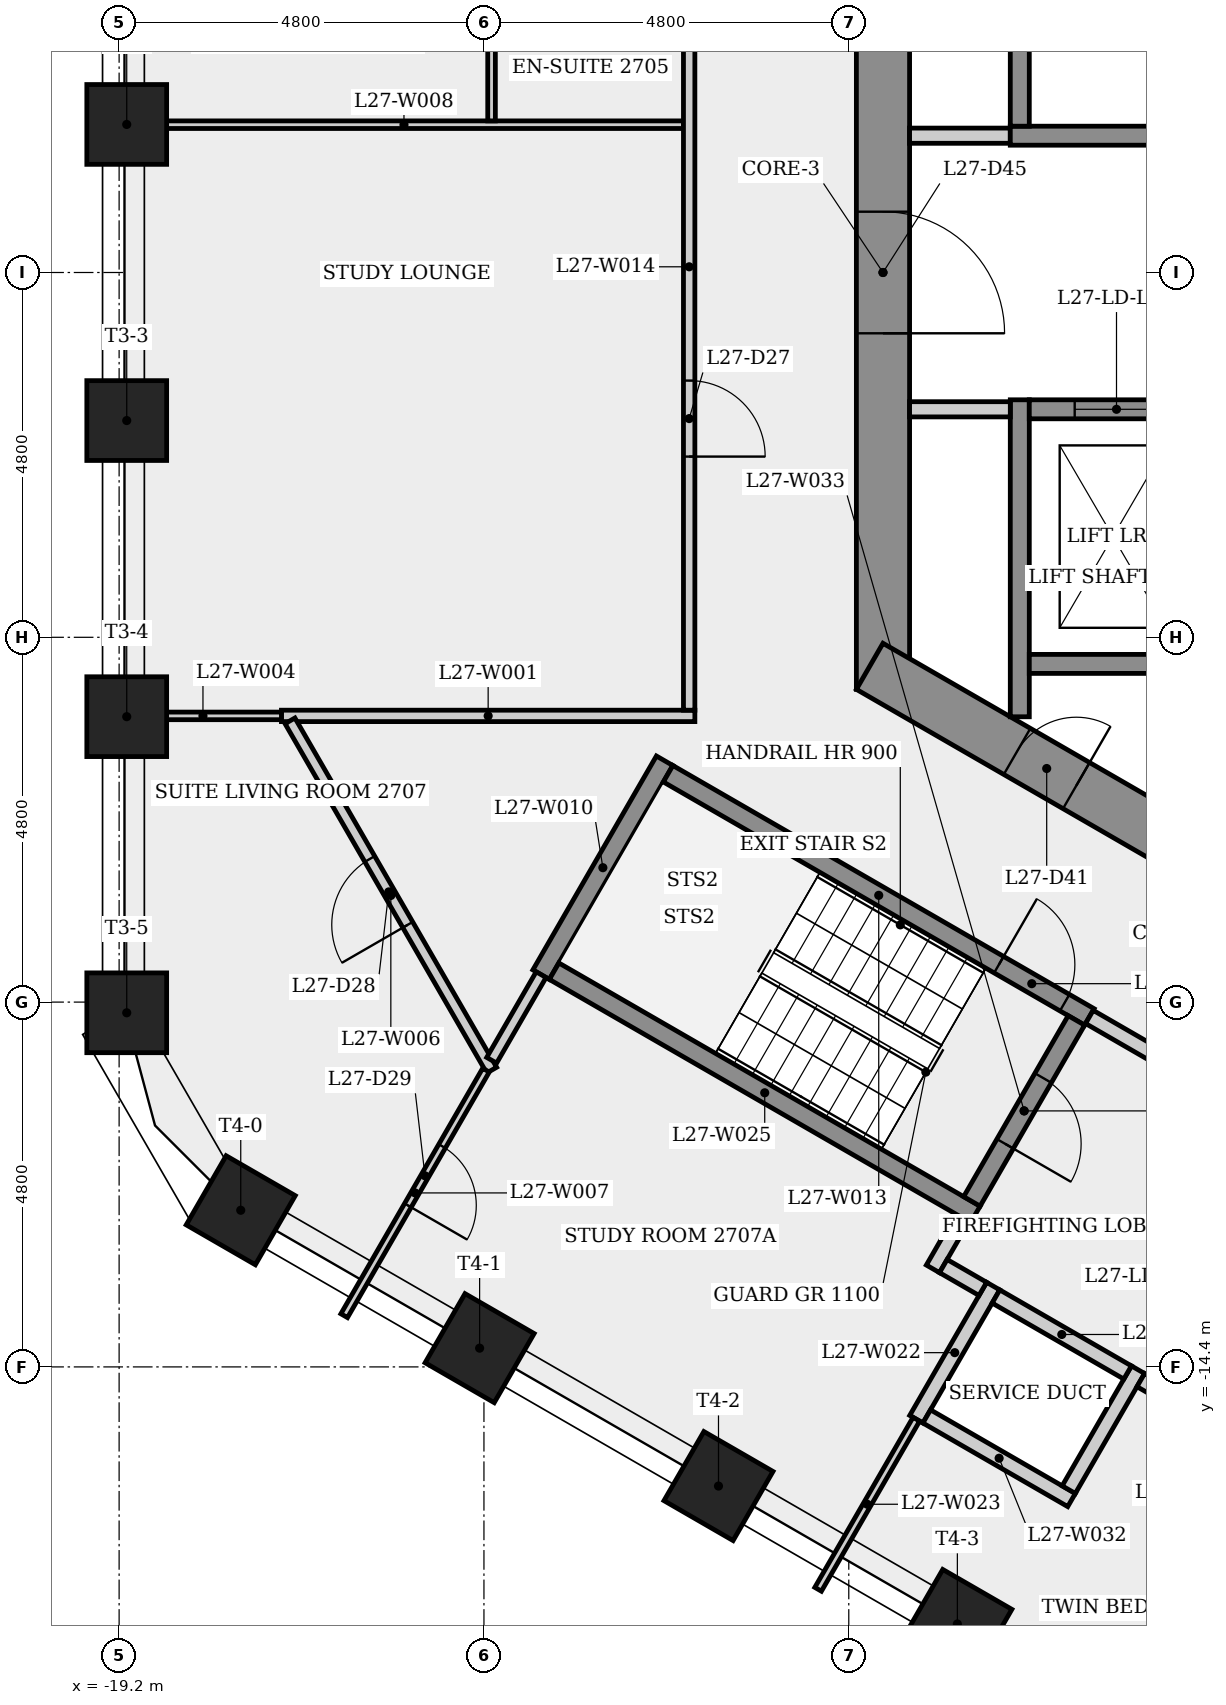
"""IFC4 building model, lengths in metres.
Left out: names, types, materials, properties, quantities, classifications, styles, units other than length and angle.
Written with IfcOpenShell. Run it as: python <this file> out.ifc"""

import sys

from ifc_helpers import new_model, si_unit, direction, frame, frame_2d, origin, origin_2d, place, context, subcontext, project, spatial, rectangle, extrude, element, fill, save


model = new_model("IFC4")
c1 = context("Model", 3, precision=1e-05, world=origin(), true_north=direction((0.0, 1.0)))
c2 = subcontext(c1, "Body", "Model", "MODEL_VIEW")
j1 = project(units=[si_unit("LENGTHUNIT", "METRE"), si_unit("PLANEANGLEUNIT", "RADIAN")], contexts=[c1])
p1 = place(None, origin())
s1 = spatial("IfcSite", under=j1, at=p1, CompositionType="ELEMENT")
p2 = place(p1, origin())
s2 = spatial("IfcBuilding", under=s1, at=p2, CompositionType="ELEMENT")
p3 = place(p2, frame((0.0, 0.0, 103.5)))
s3 = spatial("IfcBuildingStorey", under=s2, at=p3, CompositionType="ELEMENT", Elevation=103.5)
p4 = place(p3, frame((-9.15, 5.485, 0.0), z_axis=(0.0, 0.0, 1.0), x_axis=(0.0, -1.0, 0.0)))
e1 = element("IfcWall", 1, at=p4, inside=s3, PredefinedType="SHEAR", context=c2, shape_type="SweptSolid", body=[
    extrude(rectangle(XDim=10.97, YDim=0.7, at=frame_2d((5.485, 0.0))), origin(), (0.0, 0.0, 1.0), 3.4),
])
p5 = place(p4, frame((4.685, 0.0, 0.0)))
e2 = element("IfcOpeningElement", 2, at=p5, cuts=e1, PredefinedType="OPENING", context=c2, shape_type="SweptSolid", body=[
    extrude(rectangle(XDim=1.6, YDim=2.1, at=frame_2d((0.8, 1.05))), frame((0.0, 0.36, 0.0), z_axis=(0.0, -1.0, 0.0), x_axis=(1.0, 0.0, 0.0)), (0.0, 0.0, 1.0), 0.72),
])
p6 = place(p3, frame((-9.325, -5.182, 0.0), z_axis=(0.0, 0.0, 1.0), x_axis=(0.866023993627, -0.500002442456, 0.0)))
e3 = element("IfcWall", 3, at=p6, inside=s3, PredefinedType="SHEAR", context=c2, shape_type="SweptSolid", body=[
    extrude(rectangle(XDim=10.97, YDim=0.7, at=frame_2d((5.485, 0.0))), origin(), (0.0, 0.0, 1.0), 3.4),
])
p7 = place(p6, frame((2.239, 0.0, 0.0)))
e4 = element("IfcOpeningElement", 4, at=p7, cuts=e3, PredefinedType="OPENING", context=c2, shape_type="SweptSolid", body=[
    extrude(rectangle(XDim=0.9, YDim=2.1, at=frame_2d((0.45, 1.05))), frame((0.0, 0.36, 0.0), z_axis=(0.0, -1.0, 0.0), x_axis=(1.0, 0.0, 0.0)), (0.0, 0.0, 1.0), 0.72),
])
p8 = place(p6, frame((8.96, 0.0, 0.0)))
e5 = element("IfcOpeningElement", 5, at=p8, cuts=e3, PredefinedType="OPENING", context=c2, shape_type="SweptSolid", body=[
    extrude(rectangle(XDim=0.9, YDim=2.1, at=frame_2d((0.45, 1.05))), frame((0.0, 0.36, 0.0), z_axis=(0.0, -1.0, 0.0), x_axis=(1.0, 0.0, 0.0)), (0.0, 0.0, 1.0), 0.72),
])
for number, where, z_axis, x_axis in (
    (6, (-19.1, 1.948, 0.0), (0.0, 0.0, 1.0), (-1.0, 0.0, 0.0)),
    (7, (-19.1, -1.948, 0.0), (0.0, 0.0, 1.0), (-1.0, 0.0, 0.0)),
    (8, (-19.1, -5.844, 0.0), (0.0, 0.0, 1.0), (-1.0, 0.0, 0.0)),
    (9, (-19.1, -9.741, 0.0), (0.0, 0.0, 1.0), (-1.0, 0.0, 0.0)),
    (10, (-17.6, -12.339, 0.0), (0.0, 0.0, 1.0), (-0.5, -0.866, 0.0)),
    (11, (-14.457, -14.153, 0.0), (0.0, 0.0, 1.0), (-0.5, -0.866, 0.0)),
    (12, (-11.314, -15.968, 0.0), (0.0, 0.0, 1.0), (-0.5, -0.866, 0.0)),
    (13, (-8.171, -17.782, 0.0), (0.0, 0.0, 1.0), (-0.5, -0.866, 0.0)),
):
    element("IfcColumn", number, at=place(p3, frame(where, z_axis=z_axis, x_axis=x_axis)), inside=s3, PredefinedType="COLUMN", context=c2, shape_type="SweptSolid", body=[
        extrude(rectangle(XDim=1.05, YDim=1.05, at=origin_2d()), origin(), (0.0, 0.0, 1.0), 3.4),
    ])
p9 = place(p3, frame((-17.064, -5.834, 0.0), z_axis=(0.0, 0.0, 1.0), x_axis=(1.0, 0.0, 0.0)))
e14 = element("IfcWall", 14, at=p9, inside=s3, PredefinedType="PARTITIONING", context=c2, shape_type="SweptSolid", body=[
    extrude(rectangle(XDim=5.439, YDim=0.15, at=frame_2d((2.72, 0.0))), origin(), (0.0, 0.0, 1.0), 3.05),
])
p10 = place(p3, frame((-17.064, -5.834, 0.0), z_axis=(0.0, 0.0, 1.0), x_axis=(-1.0, 0.0, 0.0)))
e15 = element("IfcWall", 15, at=p10, inside=s3, PredefinedType="PARTITIONING", context=c2, shape_type="SweptSolid", body=[
    extrude(rectangle(XDim=2.065, YDim=0.1, at=frame_2d((1.033, 0.0))), origin(), (0.0, 0.0, 1.0), 3.05),
])
p11 = place(p3, frame((-14.298, -10.495, 0.0), z_axis=(0.0, 0.0, 1.0), x_axis=(-0.499993231937, 0.866029311292, 0.0)))
e16 = element("IfcWall", 16, at=p11, inside=s3, PredefinedType="PARTITIONING", context=c2, shape_type="SweptSolid", body=[
    extrude(rectangle(XDim=5.307, YDim=0.15, at=frame_2d((2.654, 0.0))), origin(), (0.0, 0.0, 1.0), 3.05),
])
p12 = place(p11, frame((2.208, 0.0, 0.0)))
e17 = element("IfcOpeningElement", 17, at=p12, cuts=e16, PredefinedType="OPENING", context=c2, shape_type="SweptSolid", body=[
    extrude(rectangle(XDim=1.0, YDim=2.1, at=frame_2d((0.5, 1.05))), frame((0.0, 0.085, 0.0), z_axis=(0.0, -1.0, 0.0), x_axis=(1.0, 0.0, 0.0)), (0.0, 0.0, 1.0), 0.17),
])
p13 = place(p3, frame((-14.373, -10.495, 0.0), z_axis=(0.0, 0.0, 1.0), x_axis=(-0.500017007625, -0.866015584205, 0.0)))
e18 = element("IfcWall", 18, at=p13, inside=s3, PredefinedType="PARTITIONING", context=c2, shape_type="SweptSolid", body=[
    extrude(rectangle(XDim=3.731, YDim=0.1, at=frame_2d((1.865, 0.0))), origin(), (0.0, 0.0, 1.0), 3.05),
])
p14 = place(p13, frame((1.155, 0.0, 0.0)))
e19 = element("IfcOpeningElement", 19, at=p14, cuts=e18, PredefinedType="OPENING", context=c2, shape_type="SweptSolid", body=[
    extrude(rectangle(XDim=0.9, YDim=2.1, at=frame_2d((0.45, 1.05))), frame((0.0, 0.06, 0.0), z_axis=(0.0, -1.0, 0.0), x_axis=(1.0, 0.0, 0.0)), (0.0, 0.0, 1.0), 0.12),
])
p15 = place(p3, frame((-19.129, 1.945, 0.0), z_axis=(0.0, 0.0, 1.0), x_axis=(1.0, 0.0, 0.0)))
e20 = element("IfcWall", 20, at=p15, inside=s3, PredefinedType="PARTITIONING", context=c2, shape_type="SweptSolid", body=[
    extrude(rectangle(XDim=7.354, YDim=0.1, at=frame_2d((3.677, 0.0))), origin(), (0.0, 0.0, 1.0), 3.05),
])
p16 = place(p3, frame((-14.3, 4.095, 0.0), z_axis=(0.0, 0.0, 1.0), x_axis=(0.0, -1.0, 0.0)))
e21 = element("IfcWall", 21, at=p16, inside=s3, PredefinedType="PARTITIONING", context=c2, shape_type="SweptSolid", body=[
    extrude(rectangle(XDim=2.1, YDim=0.1, at=frame_2d((1.05, 0.0))), origin(), (0.0, 0.0, 1.0), 3.05),
])
p17 = place(p3, frame((-13.648, -9.239, 0.0), z_axis=(0.0, 0.0, 1.0), x_axis=(0.500017246033, 0.866015446554, 0.0)))
e22 = element("IfcWall", 22, at=p17, inside=s3, PredefinedType="SHEAR", context=c2, shape_type="SweptSolid", body=[
    extrude(rectangle(XDim=3.25, YDim=0.25, at=frame_2d((1.625, 0.0))), origin(), (0.0, 0.0, 1.0), 3.05),
])
p18 = place(p3, frame((-13.648, -9.239, 0.0), z_axis=(0.0, 0.0, 1.0), x_axis=(-0.500074377092, -0.865982457891, 0.0)))
e23 = element("IfcWall", 23, at=p18, inside=s3, PredefinedType="PARTITIONING", context=c2, shape_type="SweptSolid", body=[
    extrude(rectangle(XDim=1.301, YDim=0.15, at=frame_2d((0.65, 0.0))), origin(), (0.0, 0.0, 1.0), 3.05),
])
p19 = place(p3, frame((-11.977, -6.595, 0.0), z_axis=(0.0, 0.0, 1.0), x_axis=(0.866025499775, -0.499999833739, 0.0)))
e24 = element("IfcWall", 24, at=p19, inside=s3, PredefinedType="SHEAR", context=c2, shape_type="SweptSolid", body=[
    extrude(rectangle(XDim=6.4, YDim=0.25, at=frame_2d((3.2, 0.0))), origin(), (0.0, 0.0, 1.0), 3.05),
])
p20 = place(p19, frame((5.025, 0.0, 0.0)))
e25 = element("IfcOpeningElement", 25, at=p20, cuts=e24, PredefinedType="OPENING", context=c2, shape_type="SweptSolid", body=[
    extrude(rectangle(XDim=1.0, YDim=2.1, at=frame_2d((0.5, 1.05))), frame((0.0, 0.135, 0.0), z_axis=(0.0, -1.0, 0.0), x_axis=(1.0, 0.0, 0.0)), (0.0, 0.0, 1.0), 0.27),
])
p21 = place(p3, frame((-11.7, 5.909, 0.0), z_axis=(0.0, 0.0, 1.0), x_axis=(0.0, -1.0, 0.0)))
e26 = element("IfcWall", 26, at=p21, inside=s3, PredefinedType="PARTITIONING", context=c2, shape_type="SweptSolid", body=[
    extrude(rectangle(XDim=11.668, YDim=0.15, at=frame_2d((5.834, 0.0))), origin(), (0.0, 0.0, 1.0), 3.05),
])
p22 = place(p21, frame((7.331, 0.0, 0.0)))
e27 = element("IfcOpeningElement", 27, at=p22, cuts=e26, PredefinedType="OPENING", context=c2, shape_type="SweptSolid", body=[
    extrude(rectangle(XDim=1.0, YDim=2.1, at=frame_2d((0.5, 1.05))), frame((0.0, 0.085, 0.0), z_axis=(0.0, -1.0, 0.0), x_axis=(1.0, 0.0, 0.0)), (0.0, 0.0, 1.0), 0.17),
])
p23 = place(p3, frame((-8.8, 1.8, 0.0), z_axis=(0.0, 0.0, 1.0), x_axis=(1.0, 0.0, 0.0)))
e28 = element("IfcWall", 28, at=p23, inside=s3, PredefinedType="PARTITIONING", context=c2, shape_type="SweptSolid", body=[
    extrude(rectangle(XDim=1.325, YDim=0.2, at=frame_2d((0.663, 0.0))), origin(), (0.0, 0.0, 1.0), 3.05),
])
p24 = place(p3, frame((-8.711, -15.088, 0.0), z_axis=(0.0, 0.0, 1.0), x_axis=(0.500060350025, 0.865990557877, 0.0)))
e29 = element("IfcWall", 29, at=p24, inside=s3, PredefinedType="PLUMBINGWALL", context=c2, shape_type="SweptSolid", body=[
    extrude(rectangle(XDim=2.022, YDim=0.2, at=frame_2d((1.011, 0.0))), origin(), (0.0, 0.0, 1.0), 3.05),
])
p25 = place(p3, frame((-8.711, -15.088, 0.0), z_axis=(0.0, 0.0, 1.0), x_axis=(-0.500030472146, -0.866007809968, 0.0)))
e30 = element("IfcWall", 30, at=p25, inside=s3, PredefinedType="PARTITIONING", context=c2, shape_type="SweptSolid", body=[
    extrude(rectangle(XDim=2.584, YDim=0.1, at=frame_2d((1.292, 0.0))), origin(), (0.0, 0.0, 1.0), 3.05),
])
p26 = place(p3, frame((-8.493, -13.11, 0.0), z_axis=(0.0, 0.0, 1.0), x_axis=(0.500067724834, 0.865986299303, 0.0)))
e31 = element("IfcWall", 31, at=p26, inside=s3, PredefinedType="PARTITIONING", context=c2, shape_type="SweptSolid", body=[
    extrude(rectangle(XDim=0.775, YDim=0.2, at=frame_2d((0.388, 0.0))), origin(), (0.0, 0.0, 1.0), 3.05),
])
p27 = place(p3, frame((-7.935, -12.393, 0.0), z_axis=(0.0, 0.0, 1.0), x_axis=(-0.866025499775, 0.499999833739, 0.0)))
e32 = element("IfcWall", 32, at=p27, inside=s3, PredefinedType="SHEAR", context=c2, shape_type="SweptSolid", body=[
    extrude(rectangle(XDim=6.4, YDim=0.25, at=frame_2d((3.2, 0.0))), origin(), (0.0, 0.0, 1.0), 3.05),
])
p28 = place(p3, frame((-7.836, -13.373, 0.0), z_axis=(0.0, 0.0, 1.0), x_axis=(-0.866232998003, 0.499640263761, 0.0)))
e33 = element("IfcWall", 33, at=p28, inside=s3, PredefinedType="PARTITIONING", context=c2, shape_type="SweptSolid", body=[
    extrude(rectangle(XDim=0.6, YDim=0.2, at=frame_2d((0.3, 0.0))), origin(), (0.0, 0.0, 1.0), 3.05),
])
p29 = place(p3, frame((-7.475, 1.8, 0.0), z_axis=(0.0, 0.0, 1.0), x_axis=(1.0, 0.0, 0.0)))
e34 = element("IfcWall", 34, at=p29, inside=s3, PredefinedType="SHEAR", context=c2, shape_type="SweptSolid", body=[
    extrude(rectangle(XDim=14.95, YDim=0.25, at=frame_2d((7.475, 0.0))), origin(), (0.0, 0.0, 1.0), 3.05),
])
p30 = place(p3, frame((-7.35, -5.846, 0.0), z_axis=(0.0, 0.0, 1.0), x_axis=(0.0, 1.0, 0.0)))
e35 = element("IfcWall", 35, at=p30, inside=s3, PredefinedType="SHEAR", context=c2, shape_type="SweptSolid", body=[
    extrude(rectangle(XDim=4.171, YDim=0.25, at=frame_2d((2.085, 0.0))), origin(), (0.0, 0.0, 1.0), 3.05),
])
p31 = place(p3, frame((-7.35, 1.925, 0.0), z_axis=(0.0, 0.0, 1.0), x_axis=(0.0, 1.0, 0.0)))
e36 = element("IfcWall", 36, at=p31, inside=s3, PredefinedType="SHEAR", context=c2, shape_type="SweptSolid", body=[
    extrude(rectangle(XDim=3.921, YDim=0.25, at=frame_2d((1.96, 0.0))), origin(), (0.0, 0.0, 1.0), 3.05),
])
p32 = place(p3, frame((-7.475, -1.8, 0.0), z_axis=(0.0, 0.0, 1.0), x_axis=(-1.0, 0.0, 0.0)))
e37 = element("IfcWall", 37, at=p32, inside=s3, PredefinedType="PARTITIONING", context=c2, shape_type="SweptSolid", body=[
    extrude(rectangle(XDim=1.325, YDim=0.2, at=frame_2d((0.663, 0.0))), origin(), (0.0, 0.0, 1.0), 3.05),
])
p33 = place(p3, frame((-6.669, -16.152, 0.0), z_axis=(0.0, 0.0, 1.0), x_axis=(-0.866035918664, 0.499981787252, 0.0)))
e38 = element("IfcWall", 38, at=p33, inside=s3, PredefinedType="PLUMBINGWALL", context=c2, shape_type="SweptSolid", body=[
    extrude(rectangle(XDim=2.2, YDim=0.2, at=frame_2d((1.1, 0.0))), origin(), (0.0, 0.0, 1.0), 3.05),
])
p34 = place(p3, frame((-6.605, -9.841, 0.0), z_axis=(0.0, 0.0, 1.0), x_axis=(-0.499996545922, -0.866027397988, 0.0)))
e39 = element("IfcWall", 39, at=p34, inside=s3, PredefinedType="SHEAR", context=c2, shape_type="SweptSolid", body=[
    extrude(rectangle(XDim=2.75, YDim=0.25, at=frame_2d((1.375, 0.0))), origin(), (0.0, 0.0, 1.0), 3.05),
])
p35 = place(p34, frame((0.875, 0.0, 0.0)))
e40 = element("IfcOpeningElement", 40, at=p35, cuts=e39, PredefinedType="OPENING", context=c2, shape_type="SweptSolid", body=[
    extrude(rectangle(XDim=1.0, YDim=2.1, at=frame_2d((0.5, 1.05))), frame((0.0, 0.135, 0.0), z_axis=(0.0, -1.0, 0.0), x_axis=(1.0, 0.0, 0.0)), (0.0, 0.0, 1.0), 0.27),
])
p36 = place(p3, frame((-6.435, -9.795, 0.0), z_axis=(0.0, 0.0, 1.0), x_axis=(0.866012907634, -0.500021643343, 0.0)))
e41 = element("IfcWall", 41, at=p36, inside=s3, PredefinedType="PARTITIONING", context=c2, shape_type="SweptSolid", body=[
    extrude(rectangle(XDim=4.45, YDim=0.2, at=frame_2d((2.225, 0.0))), origin(), (0.0, 0.0, 1.0), 3.05),
])
p37 = place(p36, frame((1.675, 0.0, 0.0)))
e42 = element("IfcOpeningElement", 42, at=p37, cuts=e41, PredefinedType="OPENING", context=c2, shape_type="SweptSolid", body=[
    extrude(rectangle(XDim=1.1, YDim=2.1, at=frame_2d((0.55, 1.05))), frame((0.0, 0.11, 0.0), z_axis=(0.0, -1.0, 0.0), x_axis=(1.0, 0.0, 0.0)), (0.0, 0.0, 1.0), 0.22),
])
p38 = place(p3, frame((-5.795, -14.437, 0.0), z_axis=(0.0, 0.0, 1.0), x_axis=(-0.500000789788, -0.8660249478, 0.0)))
e43 = element("IfcWall", 43, at=p38, inside=s3, PredefinedType="PLUMBINGWALL", context=c2, shape_type="SweptSolid", body=[
    extrude(rectangle(XDim=1.822, YDim=0.2, at=frame_2d((0.911, 0.0))), origin(), (0.0, 0.0, 1.0), 3.05),
])
p39 = place(p3, frame((-5.931, -14.473, 0.0), z_axis=(0.0, 0.0, 1.0), x_axis=(-0.866041268327, 0.499972520799, 0.0)))
e44 = element("IfcWall", 44, at=p39, inside=s3, PredefinedType="PLUMBINGWALL", context=c2, shape_type="SweptSolid", body=[
    extrude(rectangle(XDim=2.0, YDim=0.2, at=frame_2d((1.0, 0.0))), origin(), (0.0, 0.0, 1.0), 3.05),
])
p40 = place(p3, frame((-7.225, -5.15, 0.0), z_axis=(0.0, 0.0, 1.0), x_axis=(1.0, 0.0, 0.0)))
e45 = element("IfcWall", 45, at=p40, inside=s3, PredefinedType="SHEAR", context=c2, shape_type="SweptSolid", body=[
    extrude(rectangle(XDim=14.7, YDim=0.25, at=frame_2d((7.35, 0.0))), origin(), (0.0, 0.0, 1.0), 3.05),
])
p41 = place(p3, frame((-7.225, -1.8, 0.0), z_axis=(0.0, 0.0, 1.0), x_axis=(1.0, 0.0, 0.0)))
e46 = element("IfcWall", 46, at=p41, inside=s3, PredefinedType="SHEAR", context=c2, shape_type="SweptSolid", body=[
    extrude(rectangle(XDim=14.7, YDim=0.25, at=frame_2d((7.35, 0.0))), origin(), (0.0, 0.0, 1.0), 3.05),
])
p42 = place(p41, frame((0.597, 0.0, 0.0)))
e47 = element("IfcOpeningElement", 47, at=p42, cuts=e46, PredefinedType="OPENING", context=c2, shape_type="SweptSolid", body=[
    extrude(rectangle(XDim=1.1, YDim=2.1, at=frame_2d((0.55, 1.05))), frame((0.0, 0.135, 0.0), z_axis=(0.0, -1.0, 0.0), x_axis=(1.0, 0.0, 0.0)), (0.0, 0.0, 1.0), 0.27),
])
p43 = place(p41, frame((3.0, 0.0, 0.0)))
e48 = element("IfcOpeningElement", 48, at=p43, cuts=e46, PredefinedType="OPENING", context=c2, shape_type="SweptSolid", body=[
    extrude(rectangle(XDim=1.1, YDim=2.1, at=frame_2d((0.55, 1.05))), frame((0.0, 0.135, 0.0), z_axis=(0.0, -1.0, 0.0), x_axis=(1.0, 0.0, 0.0)), (0.0, 0.0, 1.0), 0.27),
])
p44 = place(p41, frame((5.45, 0.0, 0.0)))
e49 = element("IfcOpeningElement", 49, at=p44, cuts=e46, PredefinedType="OPENING", context=c2, shape_type="SweptSolid", body=[
    extrude(rectangle(XDim=1.1, YDim=2.1, at=frame_2d((0.55, 1.05))), frame((0.0, 0.135, 0.0), z_axis=(0.0, -1.0, 0.0), x_axis=(1.0, 0.0, 0.0)), (0.0, 0.0, 1.0), 0.27),
])
p45 = place(p41, frame((7.9, 0.0, 0.0)))
e50 = element("IfcOpeningElement", 50, at=p45, cuts=e46, PredefinedType="OPENING", context=c2, shape_type="SweptSolid", body=[
    extrude(rectangle(XDim=1.1, YDim=2.1, at=frame_2d((0.55, 1.05))), frame((0.0, 0.135, 0.0), z_axis=(0.0, -1.0, 0.0), x_axis=(1.0, 0.0, 0.0)), (0.0, 0.0, 1.0), 0.27),
])
p46 = place(p41, frame((10.35, 0.0, 0.0)))
e51 = element("IfcOpeningElement", 51, at=p46, cuts=e46, PredefinedType="OPENING", context=c2, shape_type="SweptSolid", body=[
    extrude(rectangle(XDim=1.1, YDim=2.1, at=frame_2d((0.55, 1.05))), frame((0.0, 0.135, 0.0), z_axis=(0.0, -1.0, 0.0), x_axis=(1.0, 0.0, 0.0)), (0.0, 0.0, 1.0), 0.27),
])
p47 = place(p3, frame((-4.286, -15.423, 0.0), z_axis=(0.0, 0.0, 1.0), x_axis=(-0.866025371046, 0.500000056704, 0.0)))
e52 = element("IfcWall", 52, at=p47, inside=s3, PredefinedType="PARTITIONING", context=c2, shape_type="SweptSolid", body=[
    extrude(rectangle(XDim=1.7, YDim=0.2, at=frame_2d((0.85, 0.0))), origin(), (0.0, 0.0, 1.0), 3.05),
])
p48 = place(p42, origin())
e53 = element("IfcDoor", 53, at=p48, inside=s3, OperationType="SLIDING_TO_LEFT", PredefinedType="DOOR", context=c2, shape_type="SweptSolid", body=[
    extrude(rectangle(XDim=1.1, YDim=2.1, at=frame_2d((0.55, 1.05))), frame((0.0, 0.025, 0.0), z_axis=(0.0, -1.0, 0.0), x_axis=(1.0, 0.0, 0.0)), (0.0, 0.0, 1.0), 0.05),
])
fill(e47, e53)
p49 = place(p20, origin())
e54 = element("IfcDoor", 54, at=p49, inside=s3, OperationType="SINGLE_SWING_LEFT", PredefinedType="DOOR", context=c2, shape_type="SweptSolid", body=[
    extrude(rectangle(XDim=1.0, YDim=2.1, at=frame_2d((0.5, 1.05))), frame((0.0, 0.025, 0.0), z_axis=(0.0, -1.0, 0.0), x_axis=(1.0, 0.0, 0.0)), (0.0, 0.0, 1.0), 0.05),
])
fill(e25, e54)
p50 = place(p35, origin())
e55 = element("IfcDoor", 55, at=p50, inside=s3, OperationType="SINGLE_SWING_RIGHT", PredefinedType="DOOR", context=c2, shape_type="SweptSolid", body=[
    extrude(rectangle(XDim=1.0, YDim=2.1, at=frame_2d((0.5, 1.05))), frame((0.0, 0.025, 0.0), z_axis=(0.0, -1.0, 0.0), x_axis=(1.0, 0.0, 0.0)), (0.0, 0.0, 1.0), 0.05),
])
fill(e40, e55)
p51 = place(p22, origin())
e56 = element("IfcDoor", 56, at=p51, inside=s3, OperationType="SINGLE_SWING_RIGHT", PredefinedType="DOOR", context=c2, shape_type="SweptSolid", body=[
    extrude(rectangle(XDim=1.0, YDim=2.1, at=frame_2d((0.5, 1.05))), frame((0.0, 0.025, 0.0), z_axis=(0.0, -1.0, 0.0), x_axis=(1.0, 0.0, 0.0)), (0.0, 0.0, 1.0), 0.05),
])
fill(e27, e56)
p52 = place(p12, origin())
e57 = element("IfcDoor", 57, at=p52, inside=s3, OperationType="SINGLE_SWING_LEFT", PredefinedType="DOOR", context=c2, shape_type="SweptSolid", body=[
    extrude(rectangle(XDim=1.0, YDim=2.1, at=frame_2d((0.5, 1.05))), frame((0.0, 0.025, 0.0), z_axis=(0.0, -1.0, 0.0), x_axis=(1.0, 0.0, 0.0)), (0.0, 0.0, 1.0), 0.05),
])
fill(e17, e57)
p53 = place(p14, origin())
e58 = element("IfcDoor", 58, at=p53, inside=s3, OperationType="SINGLE_SWING_RIGHT", PredefinedType="DOOR", context=c2, shape_type="SweptSolid", body=[
    extrude(rectangle(XDim=0.9, YDim=2.1, at=frame_2d((0.45, 1.05))), frame((0.0, 0.025, 0.0), z_axis=(0.0, -1.0, 0.0), x_axis=(1.0, 0.0, 0.0)), (0.0, 0.0, 1.0), 0.05),
])
fill(e19, e58)
p54 = place(p7, origin())
e59 = element("IfcDoor", 59, at=p54, inside=s3, OperationType="SINGLE_SWING_RIGHT", PredefinedType="DOOR", context=c2, shape_type="SweptSolid", body=[
    extrude(rectangle(XDim=0.9, YDim=2.1, at=frame_2d((0.45, 1.05))), frame((0.0, 0.025, 0.0), z_axis=(0.0, -1.0, 0.0), x_axis=(1.0, 0.0, 0.0)), (0.0, 0.0, 1.0), 0.05),
])
fill(e4, e59)
p55 = place(p5, origin())
e60 = element("IfcDoor", 60, at=p55, inside=s3, OperationType="SINGLE_SWING_RIGHT", PredefinedType="DOOR", context=c2, shape_type="SweptSolid", body=[
    extrude(rectangle(XDim=1.6, YDim=2.1, at=frame_2d((0.8, 1.05))), frame((0.0, 0.025, 0.0), z_axis=(0.0, -1.0, 0.0), x_axis=(1.0, 0.0, 0.0)), (0.0, 0.0, 1.0), 0.05),
])
fill(e2, e60)
save(model, sys.argv[1])
